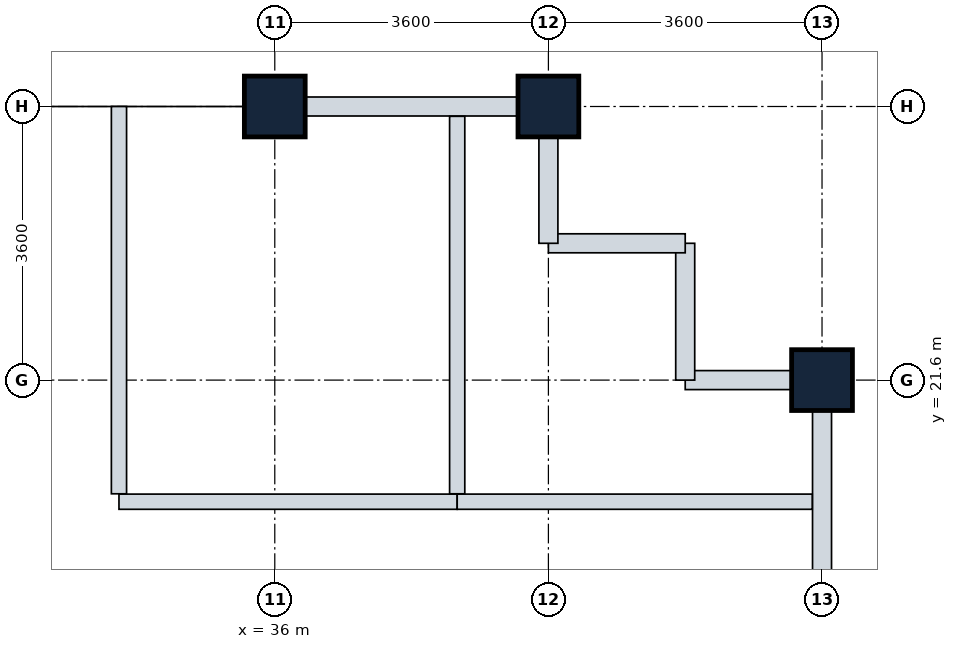
"""IFC4 building model, lengths in metres.
Left out: names, types, materials, properties, quantities, classifications, styles, units other than length and angle.
Written with IfcOpenShell. Run it as: python <this file> out.ifc"""

import sys

from ifc_helpers import new_model, si_unit, direction, frame, frame_2d, origin, origin_2d, place, context, subcontext, project, spatial, rectangle, extrude, element, fill, save


model = new_model("IFC4")
c1 = context("Model", 3, precision=1e-05, world=origin(), true_north=direction((0.0, 1.0)))
c2 = subcontext(c1, "Body", "Model", "MODEL_VIEW")
j1 = project(units=[si_unit("LENGTHUNIT", "METRE"), si_unit("PLANEANGLEUNIT", "RADIAN")], contexts=[c1])
p1 = place(None, origin())
s1 = spatial("IfcSite", under=j1, at=p1, CompositionType="ELEMENT")
p2 = place(p1, origin())
s2 = spatial("IfcBuilding", under=s1, at=p2, CompositionType="ELEMENT")
p3 = place(p2, frame((0.0, 0.0, 249.8)))
s3 = spatial("IfcBuildingStorey", under=s2, at=p3, CompositionType="ELEMENT", Elevation=249.8)
for number, where, z_axis, x_axis in (
    (1, (36.0, 25.2, 0.0), (0.0, 0.0, 1.0), (1.0, 0.0, 0.0)),
    (2, (39.6, 25.2, 0.0), (0.0, 0.0, 1.0), (1.0, 0.0, 0.0)),
    (3, (43.2, 21.6, 0.0), (0.0, 0.0, 1.0), (0.0, 1.0, 0.0)),
):
    element("IfcColumn", number, at=place(p3, frame(where, z_axis=z_axis, x_axis=x_axis)), inside=s3, PredefinedType="COLUMN", context=c2, shape_type="SweptSolid", body=[
        extrude(rectangle(XDim=0.8, YDim=0.8, at=origin_2d()), origin(), (0.0, 0.0, 1.0), 6.0),
    ])
p4 = place(p3, frame((43.2, 21.6, 0.0), z_axis=(0.0, 0.0, 1.0), x_axis=(0.0, -1.0, 0.0)))
e4 = element("IfcWall", 4, at=p4, inside=s3, PredefinedType="STANDARD", context=c2, shape_type="SweptSolid", body=[
    extrude(rectangle(XDim=3.6, YDim=0.25, at=frame_2d((1.8, 0.0))), origin(), (0.0, 0.0, 1.0), 5.23),
])
p5 = place(p3, frame((41.4, 21.6, 0.0), z_axis=(0.0, 0.0, 1.0), x_axis=(1.0, 0.0, 0.0)))
e5 = element("IfcWall", 5, at=p5, inside=s3, PredefinedType="STANDARD", context=c2, shape_type="SweptSolid", body=[
    extrude(rectangle(XDim=1.8, YDim=0.25, at=frame_2d((0.9, 0.0))), origin(), (0.0, 0.0, 1.0), 5.23),
])
for number, where, z_axis, x_axis in (
    (6, (41.4, 23.4, 0.0), (0.0, 0.0, 1.0), (0.0, -1.0, 0.0)),
    (7, (39.6, 23.4, 0.0), (0.0, 0.0, 1.0), (1.0, 0.0, 0.0)),
):
    element("IfcWall", number, at=place(p3, frame(where, z_axis=z_axis, x_axis=x_axis)), inside=s3, PredefinedType="STANDARD", context=c2, shape_type="SweptSolid", body=[
        extrude(rectangle(XDim=1.8, YDim=0.25, at=frame_2d((0.9, 0.0))), origin(), (0.0, 0.0, 1.0), 5.735),
    ])
p6 = place(p3, frame((39.6, 25.2, 0.0), z_axis=(0.0, 0.0, 1.0), x_axis=(0.0, -1.0, 0.0)))
e8 = element("IfcWall", 8, at=p6, inside=s3, PredefinedType="STANDARD", context=c2, shape_type="SweptSolid", body=[
    extrude(rectangle(XDim=1.8, YDim=0.25, at=frame_2d((0.9, 0.0))), origin(), (0.0, 0.0, 1.0), 5.23),
])
p7 = place(p3, frame((36.0, 25.2, 0.0), z_axis=(0.0, 0.0, 1.0), x_axis=(1.0, 0.0, 0.0)))
e9 = element("IfcWall", 9, at=p7, inside=s3, PredefinedType="STANDARD", context=c2, shape_type="SweptSolid", body=[
    extrude(rectangle(XDim=3.6, YDim=0.25, at=frame_2d((1.8, 0.0))), origin(), (0.0, 0.0, 1.0), 5.23),
])
p8 = place(p3, frame((33.95, 20.0, 0.0), z_axis=(0.0, 0.0, 1.0), x_axis=(1.0, 0.0, 0.0)))
e10 = element("IfcWall", 10, at=p8, inside=s3, PredefinedType="PARTITIONING", context=c2, shape_type="SweptSolid", body=[
    extrude(rectangle(XDim=4.45, YDim=0.2, at=frame_2d((2.225, 0.0))), origin(), (0.0, 0.0, 1.0), 5.42),
])
p9 = place(p8, frame((1.725, 0.0, 0.0)))
e11 = element("IfcOpeningElement", 11, at=p9, cuts=e10, PredefinedType="OPENING", context=c2, shape_type="SweptSolid", body=[
    extrude(rectangle(XDim=1.0, YDim=2.1, at=frame_2d((0.5, 1.05))), frame((0.0, 0.11, 0.0), z_axis=(0.0, -1.0, 0.0), x_axis=(1.0, 0.0, 0.0)), (0.0, 0.0, 1.0), 0.22),
])
p10 = place(p3, frame((38.4, 20.0, 0.0), z_axis=(0.0, 0.0, 1.0), x_axis=(1.0, 0.0, 0.0)))
e12 = element("IfcWall", 12, at=p10, inside=s3, PredefinedType="PARTITIONING", context=c2, shape_type="SweptSolid", body=[
    extrude(rectangle(XDim=4.671, YDim=0.2, at=frame_2d((2.335, 0.0))), origin(), (0.0, 0.0, 1.0), 5.23),
])
p11 = place(p10, frame((0.926, 0.0, 0.0)))
e13 = element("IfcOpeningElement", 13, at=p11, cuts=e12, PredefinedType="OPENING", context=c2, shape_type="SweptSolid", body=[
    extrude(rectangle(XDim=1.0, YDim=2.1, at=frame_2d((0.5, 1.05))), frame((0.0, 0.11, 0.0), z_axis=(0.0, -1.0, 0.0), x_axis=(1.0, 0.0, 0.0)), (0.0, 0.0, 1.0), 0.22),
])
p12 = place(p3, frame((38.4, 20.104, 0.0), z_axis=(0.0, 0.0, 1.0), x_axis=(0.0, 1.0, 0.0)))
e14 = element("IfcWall", 14, at=p12, inside=s3, PredefinedType="PARTITIONING", context=c2, shape_type="SweptSolid", body=[
    extrude(rectangle(XDim=4.967, YDim=0.2, at=frame_2d((2.483, 0.0))), origin(), (0.0, 0.0, 1.0), 5.23),
])
p13 = place(p3, frame((33.95, 20.104, 0.0), z_axis=(0.0, 0.0, 1.0), x_axis=(0.0, 1.0, 0.0)))
e15 = element("IfcWall", 15, at=p13, inside=s3, PredefinedType="PARTITIONING", context=c2, shape_type="SweptSolid", body=[
    extrude(rectangle(XDim=5.096, YDim=0.2, at=frame_2d((2.548, 0.0))), origin(), (0.0, 0.0, 1.0), 5.23),
])
p14 = place(p9, origin())
e16 = element("IfcDoor", 16, at=p14, inside=s3, OperationType="SINGLE_SWING_LEFT", PredefinedType="DOOR", context=c2, shape_type="SweptSolid", body=[
    extrude(rectangle(XDim=1.0, YDim=2.1, at=frame_2d((0.5, 1.05))), frame((0.0, 0.025, 0.0), z_axis=(0.0, -1.0, 0.0), x_axis=(1.0, 0.0, 0.0)), (0.0, 0.0, 1.0), 0.05),
])
fill(e11, e16)
p15 = place(p11, origin())
e17 = element("IfcDoor", 17, at=p15, inside=s3, OperationType="SINGLE_SWING_RIGHT", PredefinedType="DOOR", context=c2, shape_type="SweptSolid", body=[
    extrude(rectangle(XDim=1.0, YDim=2.1, at=frame_2d((0.5, 1.05))), frame((0.0, 0.025, 0.0), z_axis=(0.0, -1.0, 0.0), x_axis=(1.0, 0.0, 0.0)), (0.0, 0.0, 1.0), 0.05),
])
fill(e13, e17)
save(model, sys.argv[1])
